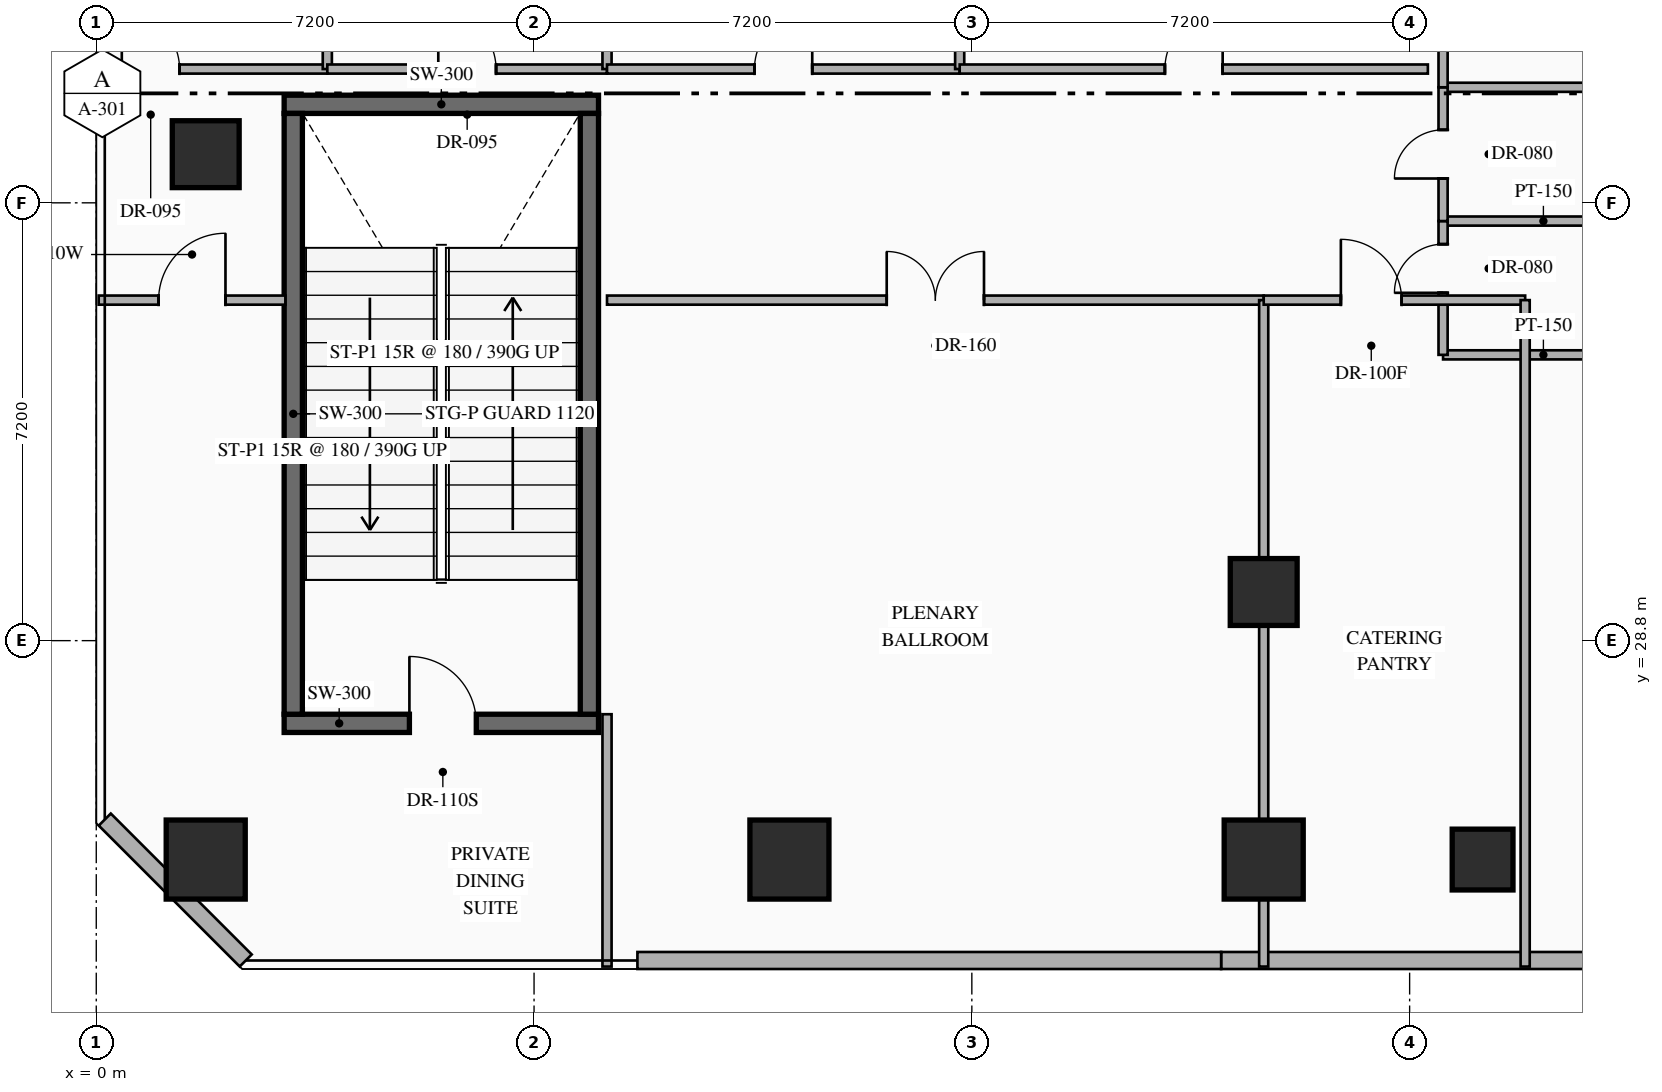
"""IFC4 building model, lengths in metres.
Left out: names, types, materials, properties, quantities, classifications, styles, units other than length and angle.
Written with IfcOpenShell. Run it as: python <this file> out.ifc"""

import sys

from ifc_helpers import new_model, si_unit, direction, frame, frame_2d, origin, origin_2d, place, context, subcontext, project, spatial, rectangle, hollow_rectangle, extrude, element, fill, save


model = new_model("IFC4")
c1 = context("Model", 3, precision=1e-05, world=origin(), true_north=direction((0.0, 1.0)))
c2 = subcontext(c1, "Body", "Model", "MODEL_VIEW")
j1 = project(units=[si_unit("LENGTHUNIT", "METRE"), si_unit("PLANEANGLEUNIT", "RADIAN")], contexts=[c1])
p1 = place(None, origin())
s1 = spatial("IfcSite", under=j1, at=p1, CompositionType="ELEMENT")
p2 = place(p1, origin())
s2 = spatial("IfcBuilding", under=s1, at=p2, CompositionType="ELEMENT")
p3 = place(p2, frame((0.0, 0.0, 16.2)))
s3 = spatial("IfcBuildingStorey", under=s2, at=p3, CompositionType="ELEMENT", Elevation=16.2)
p4 = place(p3, frame((3.09, 27.44, 0.0), z_axis=(0.0, 0.0, 1.0), x_axis=(1.0, 0.0, 0.0)))
e1 = element("IfcWall", 1, at=p4, inside=s3, PredefinedType="SHEAR", context=c2, shape_type="SweptSolid", body=[
    extrude(rectangle(XDim=5.17, YDim=0.3, at=frame_2d((2.585, 0.0))), origin(), (0.0, 0.0, 1.0), 5.4),
])
p5 = place(p4, frame((2.06, 0.0, 0.0)))
e2 = element("IfcOpeningElement", 2, at=p5, cuts=e1, PredefinedType="OPENING", context=c2, shape_type="SweptSolid", body=[
    extrude(rectangle(XDim=1.1, YDim=2.2, at=frame_2d((0.55, 1.1))), frame((0.0, 0.16, 0.0), z_axis=(0.0, -1.0, 0.0), x_axis=(1.0, 0.0, 0.0)), (0.0, 0.0, 1.0), 0.32),
])
p6 = place(p3, frame((3.09, 37.62, 0.0), z_axis=(0.0, 0.0, 1.0), x_axis=(1.0, 0.0, 0.0)))
e3 = element("IfcWall", 3, at=p6, inside=s3, PredefinedType="SHEAR", context=c2, shape_type="SweptSolid", body=[
    extrude(rectangle(XDim=5.17, YDim=0.3, at=frame_2d((2.585, 0.0))), origin(), (0.0, 0.0, 1.0), 5.4),
])
for number, where, z_axis, x_axis in (
    (4, (3.24, 27.59, 0.0), (0.0, 0.0, 1.0), (0.0, 1.0, 0.0)),
    (5, (8.11, 27.59, 0.0), (0.0, 0.0, 1.0), (0.0, 1.0, 0.0)),
):
    element("IfcWall", number, at=place(p3, frame(where, z_axis=z_axis, x_axis=x_axis)), inside=s3, PredefinedType="SHEAR", context=c2, shape_type="SweptSolid", body=[
        extrude(rectangle(XDim=9.88, YDim=0.3, at=frame_2d((4.94, 0.0))), origin(), (0.0, 0.0, 1.0), 5.4),
    ])
p7 = place(p3, frame((1.8, 25.2, 0.0), z_axis=(0.0, 0.0, 1.0), x_axis=(1.0, 0.0, 0.0)))
e6 = element("IfcColumn", 6, at=p7, inside=s3, PredefinedType="COLUMN", context=c2, shape_type="SweptSolid", body=[
    extrude(rectangle(XDim=1.3, YDim=1.3, at=origin_2d()), origin(), (0.0, 0.0, 1.0), 5.4),
])
p8 = place(p3, frame((1.8, 36.8, 0.0), z_axis=(0.0, 0.0, 1.0), x_axis=(1.0, 0.0, 0.0)))
e7 = element("IfcColumn", 7, at=p8, inside=s3, PredefinedType="COLUMN", context=c2, shape_type="SweptSolid", body=[
    extrude(hollow_rectangle(XDim=1.1, YDim=1.1, WallThickness=0.04, at=origin_2d()), origin(), (0.0, 0.0, 1.0), 5.4),
])
for number, where, z_axis, x_axis in (
    (8, (11.4, 25.2, 0.0), (0.0, 0.0, 1.0), (1.0, 0.0, 0.0)),
    (9, (19.2, 25.2, 0.0), (0.0, 0.0, 1.0), (1.0, 0.0, 0.0)),
):
    element("IfcColumn", number, at=place(p3, frame(where, z_axis=z_axis, x_axis=x_axis)), inside=s3, PredefinedType="COLUMN", context=c2, shape_type="SweptSolid", body=[
        extrude(rectangle(XDim=1.3, YDim=1.3, at=origin_2d()), origin(), (0.0, 0.0, 1.0), 5.4),
    ])
p9 = place(p3, frame((19.2, 29.6, 0.0), z_axis=(0.0, 0.0, 1.0), x_axis=(1.0, 0.0, 0.0)))
e10 = element("IfcColumn", 10, at=p9, inside=s3, PredefinedType="COLUMN", context=c2, shape_type="SweptSolid", body=[
    extrude(hollow_rectangle(XDim=1.1, YDim=1.1, WallThickness=0.04, at=origin_2d()), origin(), (0.0, 0.0, 1.0), 5.4),
])
p10 = place(p3, frame((22.8, 25.2, 0.0), z_axis=(0.0, 0.0, 1.0), x_axis=(1.0, 0.0, 0.0)))
e11 = element("IfcColumn", 11, at=p10, inside=s3, PredefinedType="COLUMN", context=c2, shape_type="SweptSolid", body=[
    extrude(hollow_rectangle(XDim=1.0, YDim=1.0, WallThickness=0.038, at=origin_2d()), origin(), (0.0, 0.0, 1.0), 5.4),
])
p11 = place(p3, frame((25.247, 23.54, 0.0), z_axis=(0.0, 0.0, 1.0), x_axis=(-1.0, 0.0, 0.0)))
e12 = element("IfcWall", 12, at=p11, inside=s3, PredefinedType="STANDARD", context=c2, shape_type="SweptSolid", body=[
    extrude(rectangle(XDim=6.747, YDim=0.28, at=frame_2d((3.374, 0.0))), origin(), (0.0, 0.0, 1.0), 5.1),
])
p12 = place(p3, frame((18.5, 23.54, 0.0), z_axis=(0.0, 0.0, 1.0), x_axis=(-1.0, 0.0, 0.0)))
e13 = element("IfcWall", 13, at=p12, inside=s3, PredefinedType="STANDARD", context=c2, shape_type="SweptSolid", body=[
    extrude(rectangle(XDim=9.6, YDim=0.28, at=frame_2d((4.8, 0.0))), origin(), (0.0, 0.0, 1.0), 5.1),
])
p13 = place(p3, frame((2.458, 23.54, 0.0), z_axis=(0.0, 0.0, 1.0), x_axis=(-0.707144017911, 0.707069542501, 0.0)))
e14 = element("IfcWall", 14, at=p13, inside=s3, PredefinedType="STANDARD", context=c2, shape_type="SweptSolid", body=[
    extrude(rectangle(XDim=3.278, YDim=0.28, at=frame_2d((1.639, 0.0))), origin(), (0.0, 0.0, 1.0), 5.1),
])
for number, where, z_axis, x_axis in (
    (15, (22.15, 33.5, 0.0), (0.0, 0.0, 1.0), (1.0, 0.0, 0.0)),
    (16, (22.15, 35.7, 0.0), (0.0, 0.0, 1.0), (1.0, 0.0, 0.0)),
    (17, (22.15, 37.9, 0.0), (0.0, 0.0, 1.0), (1.0, 0.0, 0.0)),
):
    element("IfcWall", number, at=place(p3, frame(where, z_axis=z_axis, x_axis=x_axis)), inside=s3, PredefinedType="PARTITIONING", context=c2, shape_type="SweptSolid", body=[
        extrude(rectangle(XDim=3.3, YDim=0.15, at=frame_2d((1.65, 0.0))), origin(), (0.0, 0.0, 1.0), 5.1),
    ])
p14 = place(p3, frame((22.15, 33.5, 0.0), z_axis=(0.0, 0.0, 1.0), x_axis=(0.0, 1.0, 0.0)))
e18 = element("IfcWall", 18, at=p14, inside=s3, PredefinedType="PARTITIONING", context=c2, shape_type="SweptSolid", body=[
    extrude(rectangle(XDim=2.2, YDim=0.15, at=frame_2d((1.1, 0.0))), origin(), (0.0, 0.0, 1.0), 5.1),
])
p15 = place(p14, frame((1.02, 0.0, 0.0)))
e19 = element("IfcOpeningElement", 19, at=p15, cuts=e18, PredefinedType="OPENING", context=c2, shape_type="SweptSolid", body=[
    extrude(rectangle(XDim=0.8, YDim=2.06, at=frame_2d((0.4, 1.03))), frame((0.0, 0.085, 0.0), z_axis=(0.0, -1.0, 0.0), x_axis=(1.0, 0.0, 0.0)), (0.0, 0.0, 1.0), 0.17),
])
p16 = place(p3, frame((22.15, 35.7, 0.0), z_axis=(0.0, 0.0, 1.0), x_axis=(0.0, 1.0, 0.0)))
e20 = element("IfcWall", 20, at=p16, inside=s3, PredefinedType="PARTITIONING", context=c2, shape_type="SweptSolid", body=[
    extrude(rectangle(XDim=2.2, YDim=0.15, at=frame_2d((1.1, 0.0))), origin(), (0.0, 0.0, 1.0), 5.1),
])
p17 = place(p16, frame((0.7, 0.0, 0.0)))
e21 = element("IfcOpeningElement", 21, at=p17, cuts=e20, PredefinedType="OPENING", context=c2, shape_type="SweptSolid", body=[
    extrude(rectangle(XDim=0.8, YDim=2.06, at=frame_2d((0.4, 1.03))), frame((0.0, 0.085, 0.0), z_axis=(0.0, -1.0, 0.0), x_axis=(1.0, 0.0, 0.0)), (0.0, 0.0, 1.0), 0.17),
])
p18 = place(p3, frame((22.15, 37.9, 0.0), z_axis=(0.0, 0.0, 1.0), x_axis=(0.0, 1.0, 0.0)))
e22 = element("IfcWall", 22, at=p18, inside=s3, PredefinedType="PARTITIONING", context=c2, shape_type="SweptSolid", body=[
    extrude(rectangle(XDim=2.2, YDim=0.15, at=frame_2d((1.1, 0.0))), origin(), (0.0, 0.0, 1.0), 5.1),
])
p19 = place(p18, frame((0.86, 0.0, 0.0)))
e23 = element("IfcOpeningElement", 23, at=p19, cuts=e22, PredefinedType="OPENING", context=c2, shape_type="SweptSolid", body=[
    extrude(rectangle(XDim=0.8, YDim=2.06, at=frame_2d((0.4, 1.03))), frame((0.0, 0.085, 0.0), z_axis=(0.0, -1.0, 0.0), x_axis=(1.0, 0.0, 0.0)), (0.0, 0.0, 1.0), 0.17),
])
p20 = place(p3, frame((0.04, 38.2, 0.0), z_axis=(0.0, 0.0, 1.0), x_axis=(1.0, 0.0, 0.0)))
e24 = element("IfcWall", 24, at=p20, inside=s3, PredefinedType="PARTITIONING", context=c2, shape_type="SweptSolid", body=[
    extrude(rectangle(XDim=3.76, YDim=0.15, at=frame_2d((1.88, 0.0))), origin(), (0.0, 0.0, 1.0), 5.1),
])
p21 = place(p20, frame((0.38, 0.0, 0.0)))
e25 = element("IfcOpeningElement", 25, at=p21, cuts=e24, PredefinedType="OPENING", context=c2, shape_type="SweptSolid", body=[
    extrude(rectangle(XDim=0.95, YDim=2.15, at=frame_2d((0.475, 1.075))), frame((0.0, 0.085, 0.0), z_axis=(0.0, -1.0, 0.0), x_axis=(1.0, 0.0, 0.0)), (0.0, 0.0, 1.0), 0.17),
])
p22 = place(p3, frame((3.8, 38.2, 0.0), z_axis=(0.0, 0.0, 1.0), x_axis=(0.0, 1.0, 0.0)))
e26 = element("IfcWall", 26, at=p22, inside=s3, PredefinedType="PARTITIONING", context=c2, shape_type="SweptSolid", body=[
    extrude(rectangle(XDim=13.36, YDim=0.15, at=frame_2d((6.68, 0.0))), origin(), (0.0, 0.0, 1.0), 5.1),
])
p23 = place(p3, frame((3.8, 38.2, 0.0), z_axis=(0.0, 0.0, 1.0), x_axis=(1.0, 0.0, 0.0)))
e27 = element("IfcWall", 27, at=p23, inside=s3, PredefinedType="PARTITIONING", context=c2, shape_type="SweptSolid", body=[
    extrude(rectangle(XDim=4.6, YDim=0.15, at=frame_2d((2.3, 0.0))), origin(), (0.0, 0.0, 1.0), 5.1),
])
p24 = place(p23, frame((1.825, 0.0, 0.0)))
e28 = element("IfcOpeningElement", 28, at=p24, cuts=e27, PredefinedType="OPENING", context=c2, shape_type="SweptSolid", body=[
    extrude(rectangle(XDim=0.95, YDim=2.15, at=frame_2d((0.475, 1.075))), frame((0.0, 0.085, 0.0), z_axis=(0.0, -1.0, 0.0), x_axis=(1.0, 0.0, 0.0)), (0.0, 0.0, 1.0), 0.17),
])
p25 = place(p3, frame((8.4, 38.2, 0.0), z_axis=(0.0, 0.0, 1.0), x_axis=(0.0, 1.0, 0.0)))
e29 = element("IfcWall", 29, at=p25, inside=s3, PredefinedType="PARTITIONING", context=c2, shape_type="SweptSolid", body=[
    extrude(rectangle(XDim=13.36, YDim=0.15, at=frame_2d((6.68, 0.0))), origin(), (0.0, 0.0, 1.0), 5.1),
])
p26 = place(p3, frame((8.4, 38.2, 0.0), z_axis=(0.0, 0.0, 1.0), x_axis=(1.0, 0.0, 0.0)))
e30 = element("IfcWall", 30, at=p26, inside=s3, PredefinedType="PARTITIONING", context=c2, shape_type="SweptSolid", body=[
    extrude(rectangle(XDim=5.8, YDim=0.15, at=frame_2d((2.9, 0.0))), origin(), (0.0, 0.0, 1.0), 5.1),
])
p27 = place(p26, frame((2.425, 0.0, 0.0)))
e31 = element("IfcOpeningElement", 31, at=p27, cuts=e30, PredefinedType="OPENING", context=c2, shape_type="SweptSolid", body=[
    extrude(rectangle(XDim=0.95, YDim=2.15, at=frame_2d((0.475, 1.075))), frame((0.0, 0.085, 0.0), z_axis=(0.0, -1.0, 0.0), x_axis=(1.0, 0.0, 0.0)), (0.0, 0.0, 1.0), 0.17),
])
p28 = place(p3, frame((14.2, 38.2, 0.0), z_axis=(0.0, 0.0, 1.0), x_axis=(0.0, 1.0, 0.0)))
e32 = element("IfcWall", 32, at=p28, inside=s3, PredefinedType="PARTITIONING", context=c2, shape_type="SweptSolid", body=[
    extrude(rectangle(XDim=13.36, YDim=0.15, at=frame_2d((6.68, 0.0))), origin(), (0.0, 0.0, 1.0), 5.1),
])
p29 = place(p3, frame((14.2, 38.2, 0.0), z_axis=(0.0, 0.0, 1.0), x_axis=(1.0, 0.0, 0.0)))
e33 = element("IfcWall", 33, at=p29, inside=s3, PredefinedType="PARTITIONING", context=c2, shape_type="SweptSolid", body=[
    extrude(rectangle(XDim=7.7, YDim=0.15, at=frame_2d((3.85, 0.0))), origin(), (0.0, 0.0, 1.0), 5.1),
])
p30 = place(p29, frame((3.375, 0.0, 0.0)))
e34 = element("IfcOpeningElement", 34, at=p30, cuts=e33, PredefinedType="OPENING", context=c2, shape_type="SweptSolid", body=[
    extrude(rectangle(XDim=0.95, YDim=2.15, at=frame_2d((0.475, 1.075))), frame((0.0, 0.085, 0.0), z_axis=(0.0, -1.0, 0.0), x_axis=(1.0, 0.0, 0.0)), (0.0, 0.0, 1.0), 0.17),
])
p31 = place(p3, frame((0.04, 34.4, 0.0), z_axis=(0.0, 0.0, 1.0), x_axis=(1.0, 0.0, 0.0)))
e35 = element("IfcWall", 35, at=p31, inside=s3, PredefinedType="PARTITIONING", context=c2, shape_type="SweptSolid", body=[
    extrude(rectangle(XDim=3.07, YDim=0.15, at=frame_2d((1.535, 0.0))), origin(), (0.0, 0.0, 1.0), 5.1),
])
p32 = place(p31, frame((0.985, 0.0, 0.0)))
e36 = element("IfcOpeningElement", 36, at=p32, cuts=e35, PredefinedType="OPENING", context=c2, shape_type="SweptSolid", body=[
    extrude(rectangle(XDim=1.1, YDim=2.16, at=frame_2d((0.55, 1.08))), frame((0.0, 0.085, 0.0), z_axis=(0.0, -1.0, 0.0), x_axis=(1.0, 0.0, 0.0)), (0.0, 0.0, 1.0), 0.17),
])
p33 = place(p3, frame((8.4, 23.44, 0.0), z_axis=(0.0, 0.0, 1.0), x_axis=(0.0, 1.0, 0.0)))
e37 = element("IfcWall", 37, at=p33, inside=s3, PredefinedType="PARTITIONING", context=c2, shape_type="SweptSolid", body=[
    extrude(rectangle(XDim=4.15, YDim=0.15, at=frame_2d((2.075, 0.0))), origin(), (0.0, 0.0, 1.0), 5.1),
])
p34 = place(p3, frame((8.4, 34.4, 0.0), z_axis=(0.0, 0.0, 1.0), x_axis=(1.0, 0.0, 0.0)))
e38 = element("IfcWall", 38, at=p34, inside=s3, PredefinedType="PARTITIONING", context=c2, shape_type="SweptSolid", body=[
    extrude(rectangle(XDim=10.8, YDim=0.15, at=frame_2d((5.4, 0.0))), origin(), (0.0, 0.0, 1.0), 5.1),
])
p35 = place(p34, frame((4.6, 0.0, 0.0)))
e39 = element("IfcOpeningElement", 39, at=p35, cuts=e38, PredefinedType="OPENING", context=c2, shape_type="SweptSolid", body=[
    extrude(rectangle(XDim=1.6, YDim=2.3, at=frame_2d((0.8, 1.15))), frame((0.0, 0.085, 0.0), z_axis=(0.0, -1.0, 0.0), x_axis=(1.0, 0.0, 0.0)), (0.0, 0.0, 1.0), 0.17),
])
p36 = place(p3, frame((19.2, 23.44, 0.0), z_axis=(0.0, 0.0, 1.0), x_axis=(0.0, 1.0, 0.0)))
e40 = element("IfcWall", 40, at=p36, inside=s3, PredefinedType="PARTITIONING", context=c2, shape_type="SweptSolid", body=[
    extrude(rectangle(XDim=10.96, YDim=0.15, at=frame_2d((5.48, 0.0))), origin(), (0.0, 0.0, 1.0), 3.895),
])
p37 = place(p3, frame((19.2, 34.4, 0.0), z_axis=(0.0, 0.0, 1.0), x_axis=(1.0, 0.0, 0.0)))
e41 = element("IfcWall", 41, at=p37, inside=s3, PredefinedType="PARTITIONING", context=c2, shape_type="SweptSolid", body=[
    extrude(rectangle(XDim=4.3, YDim=0.15, at=frame_2d((2.15, 0.0))), origin(), (0.0, 0.0, 1.0), 5.1),
])
p38 = place(p37, frame((1.269, 0.0, 0.0)))
e42 = element("IfcOpeningElement", 42, at=p38, cuts=e41, PredefinedType="OPENING", context=c2, shape_type="SweptSolid", body=[
    extrude(rectangle(XDim=1.0, YDim=2.2, at=frame_2d((0.5, 1.1))), frame((0.0, 0.085, 0.0), z_axis=(0.0, -1.0, 0.0), x_axis=(1.0, 0.0, 0.0)), (0.0, 0.0, 1.0), 0.17),
])
p39 = place(p3, frame((23.5, 23.44, 0.0), z_axis=(0.0, 0.0, 1.0), x_axis=(0.0, 1.0, 0.0)))
e43 = element("IfcWall", 43, at=p39, inside=s3, PredefinedType="PARTITIONING", context=c2, shape_type="SweptSolid", body=[
    extrude(rectangle(XDim=10.96, YDim=0.15, at=frame_2d((5.48, 0.0))), origin(), (0.0, 0.0, 1.0), 5.1),
])
p40 = place(p5, origin())
e44 = element("IfcDoor", 44, at=p40, inside=s3, OperationType="SINGLE_SWING_LEFT", PredefinedType="DOOR", context=c2, shape_type="SweptSolid", body=[
    extrude(rectangle(XDim=1.1, YDim=2.2, at=frame_2d((0.55, 1.1))), frame((0.0, 0.025, 0.0), z_axis=(0.0, -1.0, 0.0), x_axis=(1.0, 0.0, 0.0)), (0.0, 0.0, 1.0), 0.05),
])
fill(e2, e44)
p41 = place(p15, origin())
e45 = element("IfcDoor", 45, at=p41, inside=s3, OperationType="SINGLE_SWING_LEFT", PredefinedType="DOOR", context=c2, shape_type="SweptSolid", body=[
    extrude(rectangle(XDim=0.8, YDim=2.06, at=frame_2d((0.4, 1.03))), frame((0.0, 0.025, 0.0), z_axis=(0.0, -1.0, 0.0), x_axis=(1.0, 0.0, 0.0)), (0.0, 0.0, 1.0), 0.05),
])
fill(e19, e45)
p42 = place(p17, origin())
e46 = element("IfcDoor", 46, at=p42, inside=s3, OperationType="SINGLE_SWING_LEFT", PredefinedType="DOOR", context=c2, shape_type="SweptSolid", body=[
    extrude(rectangle(XDim=0.8, YDim=2.06, at=frame_2d((0.4, 1.03))), frame((0.0, 0.025, 0.0), z_axis=(0.0, -1.0, 0.0), x_axis=(1.0, 0.0, 0.0)), (0.0, 0.0, 1.0), 0.05),
])
fill(e21, e46)
p43 = place(p21, origin())
e47 = element("IfcDoor", 47, at=p43, inside=s3, OperationType="SINGLE_SWING_LEFT", PredefinedType="DOOR", context=c2, shape_type="SweptSolid", body=[
    extrude(rectangle(XDim=0.95, YDim=2.15, at=frame_2d((0.475, 1.075))), frame((0.0, 0.025, 0.0), z_axis=(0.0, -1.0, 0.0), x_axis=(1.0, 0.0, 0.0)), (0.0, 0.0, 1.0), 0.05),
])
fill(e25, e47)
p44 = place(p24, origin())
e48 = element("IfcDoor", 48, at=p44, inside=s3, OperationType="SINGLE_SWING_LEFT", PredefinedType="DOOR", context=c2, shape_type="SweptSolid", body=[
    extrude(rectangle(XDim=0.95, YDim=2.15, at=frame_2d((0.475, 1.075))), frame((0.0, 0.025, 0.0), z_axis=(0.0, -1.0, 0.0), x_axis=(1.0, 0.0, 0.0)), (0.0, 0.0, 1.0), 0.05),
])
fill(e28, e48)
p45 = place(p27, origin())
e49 = element("IfcDoor", 49, at=p45, inside=s3, OperationType="SINGLE_SWING_RIGHT", PredefinedType="DOOR", context=c2, shape_type="SweptSolid", body=[
    extrude(rectangle(XDim=0.95, YDim=2.15, at=frame_2d((0.475, 1.075))), frame((0.0, 0.025, 0.0), z_axis=(0.0, -1.0, 0.0), x_axis=(1.0, 0.0, 0.0)), (0.0, 0.0, 1.0), 0.05),
])
fill(e31, e49)
p46 = place(p30, origin())
e50 = element("IfcDoor", 50, at=p46, inside=s3, OperationType="SINGLE_SWING_RIGHT", PredefinedType="DOOR", context=c2, shape_type="SweptSolid", body=[
    extrude(rectangle(XDim=0.95, YDim=2.15, at=frame_2d((0.475, 1.075))), frame((0.0, 0.025, 0.0), z_axis=(0.0, -1.0, 0.0), x_axis=(1.0, 0.0, 0.0)), (0.0, 0.0, 1.0), 0.05),
])
fill(e34, e50)
p47 = place(p32, origin())
e51 = element("IfcDoor", 51, at=p47, inside=s3, OperationType="SINGLE_SWING_RIGHT", PredefinedType="DOOR", context=c2, shape_type="SweptSolid", body=[
    extrude(rectangle(XDim=1.1, YDim=2.16, at=frame_2d((0.55, 1.08))), frame((0.0, 0.025, 0.0), z_axis=(0.0, -1.0, 0.0), x_axis=(1.0, 0.0, 0.0)), (0.0, 0.0, 1.0), 0.05),
])
fill(e36, e51)
p48 = place(p35, origin())
e52 = element("IfcDoor", 52, at=p48, inside=s3, OperationType="DOUBLE_DOOR_SINGLE_SWING", PredefinedType="DOOR", context=c2, shape_type="SweptSolid", body=[
    extrude(rectangle(XDim=1.6, YDim=2.3, at=frame_2d((0.8, 1.15))), frame((0.0, 0.025, 0.0), z_axis=(0.0, -1.0, 0.0), x_axis=(1.0, 0.0, 0.0)), (0.0, 0.0, 1.0), 0.05),
])
fill(e39, e52)
p49 = place(p38, origin())
e53 = element("IfcDoor", 53, at=p49, inside=s3, OperationType="SINGLE_SWING_LEFT", PredefinedType="DOOR", context=c2, shape_type="SweptSolid", body=[
    extrude(rectangle(XDim=1.0, YDim=2.2, at=frame_2d((0.5, 1.1))), frame((0.0, 0.025, 0.0), z_axis=(0.0, -1.0, 0.0), x_axis=(1.0, 0.0, 0.0)), (0.0, 0.0, 1.0), 0.05),
])
fill(e42, e53)
save(model, sys.argv[1])
